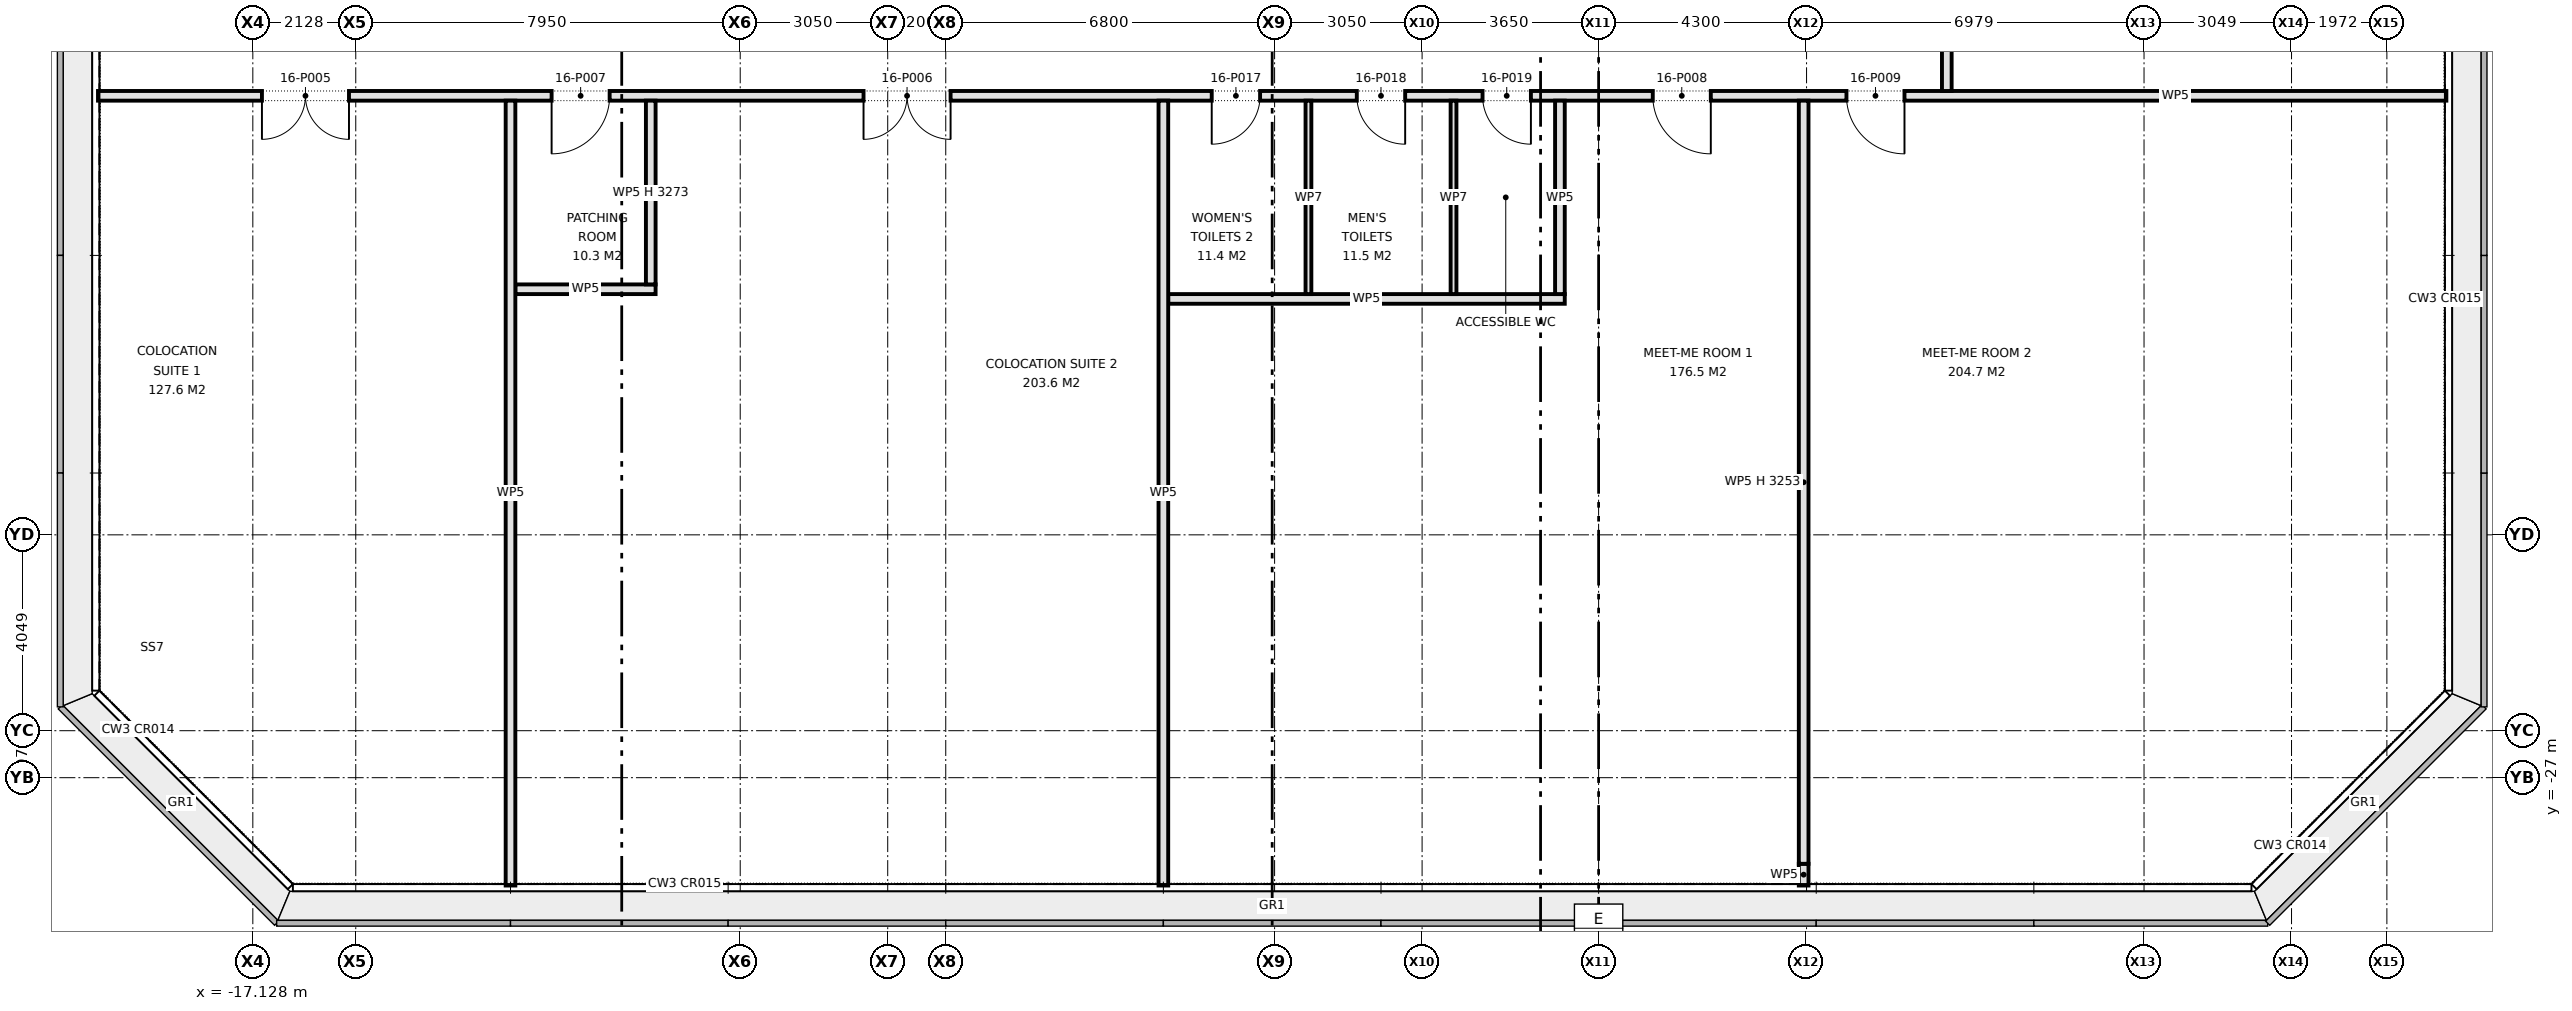
"""IFC4 building model, lengths in metres.
Left out: names, types, materials, properties, quantities, classifications, styles, units other than length and angle.
Written with IfcOpenShell. Run it as: python <this file> out.ifc"""

import sys

from ifc_helpers import new_model, si_unit, direction, frame, frame_2d, origin, place, context, subcontext, project, spatial, rectangle, extrude, element, fill, save


model = new_model("IFC4")
c1 = context("Model", 3, precision=1e-05, world=origin(), true_north=direction((0.0, 1.0)))
c2 = subcontext(c1, "Body", "Model", "MODEL_VIEW")
j1 = project(units=[si_unit("LENGTHUNIT", "METRE"), si_unit("PLANEANGLEUNIT", "RADIAN")], contexts=[c1])
p1 = place(None, origin())
s1 = spatial("IfcSite", under=j1, at=p1, CompositionType="ELEMENT")
p2 = place(p1, origin())
s2 = spatial("IfcBuilding", under=s1, at=p2, CompositionType="ELEMENT")
p3 = place(p2, frame((0.0, 0.0, 73.2)))
s3 = spatial("IfcBuildingStorey", under=s2, at=p3, CompositionType="ELEMENT", Elevation=73.2)
p4 = place(p3, frame((1.8, -17.1, 0.0), z_axis=(0.0, 0.0, 1.0), x_axis=(1.0, 0.0, 0.0)))
e1 = element("IfcWall", 1, at=p4, inside=s3, PredefinedType="PARTITIONING", context=c2, shape_type="SweptSolid", body=[
    extrude(rectangle(XDim=8.2, YDim=0.2, at=frame_2d((4.1, 0.0))), origin(), (0.0, 0.0, 1.0), 4.2),
])
p5 = place(p3, frame((-11.7, -16.9, 0.0), z_axis=(0.0, 0.0, 1.0), x_axis=(1.0, 0.0, 0.0)))
e2 = element("IfcWall", 2, at=p5, inside=s3, PredefinedType="PARTITIONING", context=c2, shape_type="SweptSolid", body=[
    extrude(rectangle(XDim=2.9, YDim=0.2, at=frame_2d((1.45, 0.0))), origin(), (0.0, 0.0, 1.0), 4.2),
])
p6 = place(p3, frame((-20.33, -12.9, 0.0), z_axis=(0.0, 0.0, 1.0), x_axis=(1.0, 0.0, 0.0)))
e3 = element("IfcWall", 3, at=p6, inside=s3, PredefinedType="PARTITIONING", context=c2, shape_type="SweptSolid", body=[
    extrude(rectangle(XDim=48.56, YDim=0.2, at=frame_2d((24.28, 0.0))), origin(), (0.0, 0.0, 1.0), 4.2),
])
p7 = place(p6, frame((3.39, 0.0, 0.0)))
e4 = element("IfcOpeningElement", 4, at=p7, cuts=e3, PredefinedType="OPENING", context=c2, shape_type="SweptSolid", body=[
    extrude(rectangle(XDim=1.8, YDim=2.1, at=frame_2d((0.9, 1.05))), frame((0.0, 0.11, 0.0), z_axis=(0.0, -1.0, 0.0), x_axis=(1.0, 0.0, 0.0)), (0.0, 0.0, 1.0), 0.22),
])
p8 = place(p6, frame((15.83, 0.0, 0.0)))
e5 = element("IfcOpeningElement", 5, at=p8, cuts=e3, PredefinedType="OPENING", context=c2, shape_type="SweptSolid", body=[
    extrude(rectangle(XDim=1.8, YDim=2.1, at=frame_2d((0.9, 1.05))), frame((0.0, 0.11, 0.0), z_axis=(0.0, -1.0, 0.0), x_axis=(1.0, 0.0, 0.0)), (0.0, 0.0, 1.0), 0.22),
])
p9 = place(p6, frame((9.38, 0.0, 0.0)))
e6 = element("IfcOpeningElement", 6, at=p9, cuts=e3, PredefinedType="OPENING", context=c2, shape_type="SweptSolid", body=[
    extrude(rectangle(XDim=1.2, YDim=2.1, at=frame_2d((0.6, 1.05))), frame((0.0, 0.11, 0.0), z_axis=(0.0, -1.0, 0.0), x_axis=(1.0, 0.0, 0.0)), (0.0, 0.0, 1.0), 0.22),
])
p10 = place(p6, frame((32.15, 0.0, 0.0)))
e7 = element("IfcOpeningElement", 7, at=p10, cuts=e3, PredefinedType="OPENING", context=c2, shape_type="SweptSolid", body=[
    extrude(rectangle(XDim=1.2, YDim=2.1, at=frame_2d((0.6, 1.05))), frame((0.0, 0.11, 0.0), z_axis=(0.0, -1.0, 0.0), x_axis=(1.0, 0.0, 0.0)), (0.0, 0.0, 1.0), 0.22),
])
p11 = place(p6, frame((36.155, 0.0, 0.0)))
e8 = element("IfcOpeningElement", 8, at=p11, cuts=e3, PredefinedType="OPENING", context=c2, shape_type="SweptSolid", body=[
    extrude(rectangle(XDim=1.2, YDim=2.1, at=frame_2d((0.6, 1.05))), frame((0.0, 0.11, 0.0), z_axis=(0.0, -1.0, 0.0), x_axis=(1.0, 0.0, 0.0)), (0.0, 0.0, 1.0), 0.22),
])
p12 = place(p6, frame((23.03, 0.0, 0.0)))
e9 = element("IfcOpeningElement", 9, at=p12, cuts=e3, PredefinedType="OPENING", context=c2, shape_type="SweptSolid", body=[
    extrude(rectangle(XDim=1.0, YDim=2.1, at=frame_2d((0.5, 1.05))), frame((0.0, 0.11, 0.0), z_axis=(0.0, -1.0, 0.0), x_axis=(1.0, 0.0, 0.0)), (0.0, 0.0, 1.0), 0.22),
])
p13 = place(p6, frame((26.03, 0.0, 0.0)))
e10 = element("IfcOpeningElement", 10, at=p13, cuts=e3, PredefinedType="OPENING", context=c2, shape_type="SweptSolid", body=[
    extrude(rectangle(XDim=1.0, YDim=2.1, at=frame_2d((0.5, 1.05))), frame((0.0, 0.11, 0.0), z_axis=(0.0, -1.0, 0.0), x_axis=(1.0, 0.0, 0.0)), (0.0, 0.0, 1.0), 0.22),
])
p14 = place(p6, frame((28.63, 0.0, 0.0)))
e11 = element("IfcOpeningElement", 11, at=p14, cuts=e3, PredefinedType="OPENING", context=c2, shape_type="SweptSolid", body=[
    extrude(rectangle(XDim=1.0, YDim=2.1, at=frame_2d((0.5, 1.05))), frame((0.0, 0.11, 0.0), z_axis=(0.0, -1.0, 0.0), x_axis=(1.0, 0.0, 0.0)), (0.0, 0.0, 1.0), 0.22),
])
p15 = place(p3, frame((17.9, -12.8, 0.0), z_axis=(0.0, 0.0, 1.0), x_axis=(0.0, 1.0, 0.0)))
e12 = element("IfcWall", 12, at=p15, inside=s3, PredefinedType="PARTITIONING", context=c2, shape_type="SweptSolid", body=[
    extrude(rectangle(XDim=25.6, YDim=0.2, at=frame_2d((12.8, 0.0))), origin(), (0.0, 0.0, 1.0), 4.2),
])
p16 = place(p15, frame((4.4, 0.0, 0.0)))
e13 = element("IfcOpeningElement", 13, at=p16, cuts=e12, PredefinedType="OPENING", context=c2, shape_type="SweptSolid", body=[
    extrude(rectangle(XDim=1.2, YDim=2.1, at=frame_2d((0.6, 1.05))), frame((0.0, 0.11, 0.0), z_axis=(0.0, -1.0, 0.0), x_axis=(1.0, 0.0, 0.0)), (0.0, 0.0, 1.0), 0.22),
])
p17 = place(p15, frame((15.95, 0.0, 0.0)))
e14 = element("IfcOpeningElement", 14, at=p17, cuts=e12, PredefinedType="OPENING", context=c2, shape_type="SweptSolid", body=[
    extrude(rectangle(XDim=1.8, YDim=2.1, at=frame_2d((0.9, 1.05))), frame((0.0, 0.11, 0.0), z_axis=(0.0, -1.0, 0.0), x_axis=(1.0, 0.0, 0.0)), (0.0, 0.0, 1.0), 0.22),
])
p18 = place(p3, frame((14.94, -29.23, 0.0), z_axis=(0.0, 0.0, 1.0), x_axis=(0.0, 1.0, 0.0)))
e15 = element("IfcWall", 15, at=p18, inside=s3, PredefinedType="PARTITIONING", context=c2, shape_type="SweptSolid", body=[
    extrude(rectangle(XDim=0.449, YDim=0.2, at=frame_2d((0.225, 0.0))), origin(), (0.0, 0.0, 1.0), 4.2),
])
p19 = place(p3, frame((14.94, -28.781, 0.0), z_axis=(0.0, 0.0, 1.0), x_axis=(0.0, 1.0, 0.0)))
e16 = element("IfcWall", 16, at=p19, inside=s3, PredefinedType="PARTITIONING", context=c2, shape_type="SweptSolid", body=[
    extrude(rectangle(XDim=15.781, YDim=0.2, at=frame_2d((7.891, 0.0))), origin(), (0.0, 0.0, 1.0), 3.253),
])
p20 = place(p3, frame((9.9, -17.0, 0.0), z_axis=(0.0, 0.0, 1.0), x_axis=(0.0, 1.0, 0.0)))
e17 = element("IfcWall", 17, at=p20, inside=s3, PredefinedType="PARTITIONING", context=c2, shape_type="SweptSolid", body=[
    extrude(rectangle(XDim=4.0, YDim=0.2, at=frame_2d((2.0, 0.0))), origin(), (0.0, 0.0, 1.0), 4.2),
])
p21 = place(p3, frame((1.7, -29.23, 0.0), z_axis=(0.0, 0.0, 1.0), x_axis=(0.0, 1.0, 0.0)))
e18 = element("IfcWall", 18, at=p21, inside=s3, PredefinedType="PARTITIONING", context=c2, shape_type="SweptSolid", body=[
    extrude(rectangle(XDim=16.23, YDim=0.2, at=frame_2d((8.115, 0.0))), origin(), (0.0, 0.0, 1.0), 4.2),
])
p22 = place(p3, frame((-8.9, -16.8, 0.0), z_axis=(0.0, 0.0, 1.0), x_axis=(0.0, 1.0, 0.0)))
e19 = element("IfcWall", 19, at=p22, inside=s3, PredefinedType="PARTITIONING", context=c2, shape_type="SweptSolid", body=[
    extrude(rectangle(XDim=3.8, YDim=0.2, at=frame_2d((1.9, 0.0))), origin(), (0.0, 0.0, 1.0), 3.273),
])
p23 = place(p3, frame((-11.8, -29.23, 0.0), z_axis=(0.0, 0.0, 1.0), x_axis=(0.0, 1.0, 0.0)))
e20 = element("IfcWall", 20, at=p23, inside=s3, PredefinedType="PARTITIONING", context=c2, shape_type="SweptSolid", body=[
    extrude(rectangle(XDim=16.23, YDim=0.2, at=frame_2d((8.115, 0.0))), origin(), (0.0, 0.0, 1.0), 4.2),
])
for number, where, z_axis, x_axis in (
    (21, (7.7, -17.0, 0.0), (0.0, 0.0, 1.0), (0.0, 1.0, 0.0)),
    (22, (4.7, -17.0, 0.0), (0.0, 0.0, 1.0), (0.0, 1.0, 0.0)),
):
    element("IfcWall", number, at=place(p3, frame(where, z_axis=z_axis, x_axis=x_axis)), inside=s3, PredefinedType="PARTITIONING", context=c2, shape_type="SweptSolid", body=[
        extrude(rectangle(XDim=4.0, YDim=0.12, at=frame_2d((2.0, 0.0))), origin(), (0.0, 0.0, 1.0), 4.2),
    ])
p24 = place(p7, frame((1.8, 0.0, 0.0), z_axis=(0.0, 0.0, 1.0), x_axis=(-1.0, 0.0, 0.0)))
e23 = element("IfcDoor", 23, at=p24, inside=s3, OperationType="DOUBLE_DOOR_SINGLE_SWING", PredefinedType="DOOR", context=c2, shape_type="SweptSolid", body=[
    extrude(rectangle(XDim=1.8, YDim=2.1, at=frame_2d((0.9, 1.05))), frame((0.0, 0.025, 0.0), z_axis=(0.0, -1.0, 0.0), x_axis=(1.0, 0.0, 0.0)), (0.0, 0.0, 1.0), 0.05),
])
fill(e4, e23)
p25 = place(p8, frame((1.8, 0.0, 0.0), z_axis=(0.0, 0.0, 1.0), x_axis=(-1.0, 0.0, 0.0)))
e24 = element("IfcDoor", 24, at=p25, inside=s3, OperationType="DOUBLE_DOOR_SINGLE_SWING", PredefinedType="DOOR", context=c2, shape_type="SweptSolid", body=[
    extrude(rectangle(XDim=1.8, YDim=2.1, at=frame_2d((0.9, 1.05))), frame((0.0, 0.025, 0.0), z_axis=(0.0, -1.0, 0.0), x_axis=(1.0, 0.0, 0.0)), (0.0, 0.0, 1.0), 0.05),
])
fill(e5, e24)
p26 = place(p9, frame((1.2, 0.0, 0.0), z_axis=(0.0, 0.0, 1.0), x_axis=(-1.0, 0.0, 0.0)))
e25 = element("IfcDoor", 25, at=p26, inside=s3, OperationType="SINGLE_SWING_RIGHT", PredefinedType="DOOR", context=c2, shape_type="SweptSolid", body=[
    extrude(rectangle(XDim=1.2, YDim=2.1, at=frame_2d((0.6, 1.05))), frame((0.0, 0.025, 0.0), z_axis=(0.0, -1.0, 0.0), x_axis=(1.0, 0.0, 0.0)), (0.0, 0.0, 1.0), 0.05),
])
fill(e6, e25)
p27 = place(p10, frame((1.2, 0.0, 0.0), z_axis=(0.0, 0.0, 1.0), x_axis=(-1.0, 0.0, 0.0)))
e26 = element("IfcDoor", 26, at=p27, inside=s3, OperationType="SINGLE_SWING_LEFT", PredefinedType="DOOR", context=c2, shape_type="SweptSolid", body=[
    extrude(rectangle(XDim=1.2, YDim=2.1, at=frame_2d((0.6, 1.05))), frame((0.0, 0.025, 0.0), z_axis=(0.0, -1.0, 0.0), x_axis=(1.0, 0.0, 0.0)), (0.0, 0.0, 1.0), 0.05),
])
fill(e7, e26)
p28 = place(p11, frame((1.2, 0.0, 0.0), z_axis=(0.0, 0.0, 1.0), x_axis=(-1.0, 0.0, 0.0)))
e27 = element("IfcDoor", 27, at=p28, inside=s3, OperationType="SINGLE_SWING_LEFT", PredefinedType="DOOR", context=c2, shape_type="SweptSolid", body=[
    extrude(rectangle(XDim=1.2, YDim=2.1, at=frame_2d((0.6, 1.05))), frame((0.0, 0.025, 0.0), z_axis=(0.0, -1.0, 0.0), x_axis=(1.0, 0.0, 0.0)), (0.0, 0.0, 1.0), 0.05),
])
fill(e8, e27)
p29 = place(p12, frame((1.0, 0.0, 0.0), z_axis=(0.0, 0.0, 1.0), x_axis=(-1.0, 0.0, 0.0)))
e28 = element("IfcDoor", 28, at=p29, inside=s3, OperationType="SINGLE_SWING_RIGHT", PredefinedType="DOOR", context=c2, shape_type="SweptSolid", body=[
    extrude(rectangle(XDim=1.0, YDim=2.1, at=frame_2d((0.5, 1.05))), frame((0.0, 0.025, 0.0), z_axis=(0.0, -1.0, 0.0), x_axis=(1.0, 0.0, 0.0)), (0.0, 0.0, 1.0), 0.05),
])
fill(e9, e28)
p30 = place(p13, frame((1.0, 0.0, 0.0), z_axis=(0.0, 0.0, 1.0), x_axis=(-1.0, 0.0, 0.0)))
e29 = element("IfcDoor", 29, at=p30, inside=s3, OperationType="SINGLE_SWING_LEFT", PredefinedType="DOOR", context=c2, shape_type="SweptSolid", body=[
    extrude(rectangle(XDim=1.0, YDim=2.1, at=frame_2d((0.5, 1.05))), frame((0.0, 0.025, 0.0), z_axis=(0.0, -1.0, 0.0), x_axis=(1.0, 0.0, 0.0)), (0.0, 0.0, 1.0), 0.05),
])
fill(e10, e29)
p31 = place(p14, frame((1.0, 0.0, 0.0), z_axis=(0.0, 0.0, 1.0), x_axis=(-1.0, 0.0, 0.0)))
e30 = element("IfcDoor", 30, at=p31, inside=s3, OperationType="SINGLE_SWING_LEFT", PredefinedType="DOOR", context=c2, shape_type="SweptSolid", body=[
    extrude(rectangle(XDim=1.0, YDim=2.1, at=frame_2d((0.5, 1.05))), frame((0.0, 0.025, 0.0), z_axis=(0.0, -1.0, 0.0), x_axis=(1.0, 0.0, 0.0)), (0.0, 0.0, 1.0), 0.05),
])
fill(e11, e30)
save(model, sys.argv[1])
